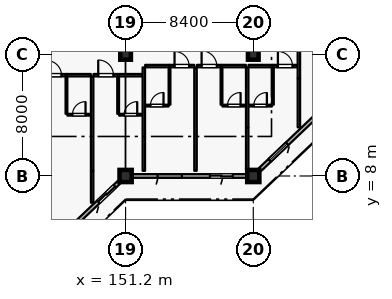
"""IFC4 building model, lengths in metres.
Left out: names, types, materials, properties, quantities, classifications, styles, units other than length and angle.
Written with IfcOpenShell. Run it as: python <this file> out.ifc"""

import sys

from ifc_helpers import new_model, si_unit, direction, frame, frame_2d, origin, origin_2d, place, context, subcontext, project, spatial, rectangle, extrude, element, fill, save


model = new_model("IFC4")
c1 = context("Model", 3, precision=1e-05, world=origin(), true_north=direction((0.0, 1.0)))
c2 = subcontext(c1, "Body", "Model", "MODEL_VIEW")
j1 = project(units=[si_unit("LENGTHUNIT", "METRE"), si_unit("PLANEANGLEUNIT", "RADIAN")], contexts=[c1])
p1 = place(None, origin())
s1 = spatial("IfcSite", under=j1, at=p1, CompositionType="ELEMENT")
p2 = place(p1, origin())
s2 = spatial("IfcBuilding", under=s1, at=p2, CompositionType="ELEMENT")
p3 = place(p2, frame((0.0, 0.0, 21.0)))
s3 = spatial("IfcBuildingStorey", under=s2, at=p3, CompositionType="ELEMENT", Elevation=21.0)
for number, where, z_axis, x_axis in (
    (1, (151.2, 8.0, 0.0), (0.0, 0.0, 1.0), (1.0, 0.0, 0.0)),
    (2, (159.6, 8.0, 0.0), (0.0, 0.0, 1.0), (1.0, 0.0, 0.0)),
):
    element("IfcColumn", number, at=place(p3, frame(where, z_axis=z_axis, x_axis=x_axis)), inside=s3, PredefinedType="COLUMN", context=c2, shape_type="SweptSolid", body=[
        extrude(rectangle(XDim=0.8, YDim=0.8, at=origin_2d()), origin(), (0.0, 0.0, 1.0), 4.2),
    ])
for number, where, z_axis, x_axis in (
    (3, (151.2, 16.0, 0.0), (0.0, 0.0, 1.0), (1.0, 0.0, 0.0)),
    (4, (159.6, 16.0, 0.0), (0.0, 0.0, 1.0), (1.0, 0.0, 0.0)),
):
    element("IfcColumn", number, at=place(p3, frame(where, z_axis=z_axis, x_axis=x_axis)), inside=s3, PredefinedType="COLUMN", context=c2, shape_type="SweptSolid", body=[
        extrude(rectangle(XDim=0.7, YDim=0.7, at=origin_2d()), origin(), (0.0, 0.0, 1.0), 4.2),
    ])
p4 = place(p3, frame((150.8, 7.619, 0.0), z_axis=(0.0, 0.0, 1.0), x_axis=(-0.724156739794, -0.689635422677, 0.0)))
e5 = element("IfcWall", 5, at=p4, inside=s3, PredefinedType="SOLIDWALL", context=c2, shape_type="SweptSolid", body=[
    extrude(rectangle(XDim=10.495, YDim=0.24, at=frame_2d((5.248, 0.0))), origin(), (0.0, 0.0, 1.0), 3.53),
])
p5 = place(p4, frame((0.424, 0.0, 0.0)))
e6 = element("IfcOpeningElement", 6, at=p5, cuts=e5, PredefinedType="OPENING", context=c2, shape_type="SweptSolid", body=[
    extrude(rectangle(XDim=1.5, YDim=2.25, at=frame_2d((0.75, 1.125))), frame((0.0, 0.13, 0.0), z_axis=(0.0, -1.0, 0.0), x_axis=(1.0, 0.0, 0.0)), (0.0, 0.0, 1.0), 0.26),
])
p6 = place(p4, frame((4.033, 0.0, 0.8)))
e7 = element("IfcOpeningElement", 7, at=p6, cuts=e5, PredefinedType="OPENING", context=c2, shape_type="SweptSolid", body=[
    extrude(rectangle(XDim=1.6, YDim=1.6, at=frame_2d((0.8, 0.8))), frame((0.0, 0.13, 0.0), z_axis=(0.0, -1.0, 0.0), x_axis=(1.0, 0.0, 0.0)), (0.0, 0.0, 1.0), 0.26),
])
p7 = place(p4, frame((8.107, 0.0, 0.8)))
e8 = element("IfcOpeningElement", 8, at=p7, cuts=e5, PredefinedType="OPENING", context=c2, shape_type="SweptSolid", body=[
    extrude(rectangle(XDim=1.6, YDim=1.6, at=frame_2d((0.8, 0.8))), frame((0.0, 0.13, 0.0), z_axis=(0.0, -1.0, 0.0), x_axis=(1.0, 0.0, 0.0)), (0.0, 0.0, 1.0), 0.26),
])
p8 = place(p3, frame((159.2, 8.0, 0.0), z_axis=(0.0, 0.0, 1.0), x_axis=(-1.0, 0.0, 0.0)))
e9 = element("IfcWall", 9, at=p8, inside=s3, PredefinedType="SOLIDWALL", context=c2, shape_type="SweptSolid", body=[
    extrude(rectangle(XDim=7.6, YDim=0.24, at=frame_2d((3.8, 0.0))), origin(), (0.0, 0.0, 1.0), 3.53),
])
p9 = place(p8, frame((0.95, 0.0, 0.0)))
e10 = element("IfcOpeningElement", 10, at=p9, cuts=e9, PredefinedType="OPENING", context=c2, shape_type="SweptSolid", body=[
    extrude(rectangle(XDim=1.5, YDim=2.25, at=frame_2d((0.75, 1.125))), frame((0.0, 0.13, 0.0), z_axis=(0.0, -1.0, 0.0), x_axis=(1.0, 0.0, 0.0)), (0.0, 0.0, 1.0), 0.26),
])
p10 = place(p8, frame((4.3, 0.0, 0.8)))
e11 = element("IfcOpeningElement", 11, at=p10, cuts=e9, PredefinedType="OPENING", context=c2, shape_type="SweptSolid", body=[
    extrude(rectangle(XDim=1.6, YDim=1.6, at=frame_2d((0.8, 0.8))), frame((0.0, 0.13, 0.0), z_axis=(0.0, -1.0, 0.0), x_axis=(1.0, 0.0, 0.0)), (0.0, 0.0, 1.0), 0.26),
])
p11 = place(p3, frame((167.6, 15.619, 0.0), z_axis=(0.0, 0.0, 1.0), x_axis=(-0.724156739794, -0.689635422677, 0.0)))
e12 = element("IfcWall", 12, at=p11, inside=s3, PredefinedType="SOLIDWALL", context=c2, shape_type="SweptSolid", body=[
    extrude(rectangle(XDim=10.495, YDim=0.24, at=frame_2d((5.248, 0.0))), origin(), (0.0, 0.0, 1.0), 3.53),
])
p12 = place(p11, frame((0.286, 0.0, 0.0)))
e13 = element("IfcOpeningElement", 13, at=p12, cuts=e12, PredefinedType="OPENING", context=c2, shape_type="SweptSolid", body=[
    extrude(rectangle(XDim=1.5, YDim=2.25, at=frame_2d((0.75, 1.125))), frame((0.0, 0.13, 0.0), z_axis=(0.0, -1.0, 0.0), x_axis=(1.0, 0.0, 0.0)), (0.0, 0.0, 1.0), 0.26),
])
p13 = place(p11, frame((3.757, 0.0, 0.8)))
e14 = element("IfcOpeningElement", 14, at=p13, cuts=e12, PredefinedType="OPENING", context=c2, shape_type="SweptSolid", body=[
    extrude(rectangle(XDim=1.6, YDim=1.6, at=frame_2d((0.8, 0.8))), frame((0.0, 0.13, 0.0), z_axis=(0.0, -1.0, 0.0), x_axis=(1.0, 0.0, 0.0)), (0.0, 0.0, 1.0), 0.26),
])
p14 = place(p11, frame((7.969, 0.0, 0.8)))
e15 = element("IfcOpeningElement", 15, at=p14, cuts=e12, PredefinedType="OPENING", context=c2, shape_type="SweptSolid", body=[
    extrude(rectangle(XDim=1.6, YDim=1.6, at=frame_2d((0.8, 0.8))), frame((0.0, 0.13, 0.0), z_axis=(0.0, -1.0, 0.0), x_axis=(1.0, 0.0, 0.0)), (0.0, 0.0, 1.0), 0.26),
])
p15 = place(p3, frame((145.69, 14.63, 0.0), z_axis=(0.0, 0.0, 1.0), x_axis=(1.0, 0.0, 0.0)))
e16 = element("IfcWall", 16, at=p15, inside=s3, PredefinedType="PARTITIONING", context=c2, shape_type="SweptSolid", body=[
    extrude(rectangle(XDim=1.62, YDim=0.16, at=frame_2d((0.81, 0.0))), origin(), (0.0, 0.0, 1.0), 3.965),
])
p16 = place(p15, frame((0.33, 0.0, 0.0)))
e17 = element("IfcOpeningElement", 17, at=p16, cuts=e16, PredefinedType="OPENING", context=c2, shape_type="SweptSolid", body=[
    extrude(rectangle(XDim=0.96, YDim=2.2, at=frame_2d((0.48, 1.1))), frame((0.0, 0.09, 0.0), z_axis=(0.0, -1.0, 0.0), x_axis=(1.0, 0.0, 0.0)), (0.0, 0.0, 1.0), 0.18),
])
p17 = place(p3, frame((147.32, 14.63, 0.0), z_axis=(0.0, 0.0, 1.0), x_axis=(1.0, 0.0, 0.0)))
e18 = element("IfcWall", 18, at=p17, inside=s3, PredefinedType="PARTITIONING", context=c2, shape_type="SweptSolid", body=[
    extrude(rectangle(XDim=1.59, YDim=0.16, at=frame_2d((0.795, 0.0))), origin(), (0.0, 0.0, 1.0), 3.965),
])
p18 = place(p3, frame((147.31, 12.09, 0.0), z_axis=(0.0, 0.0, 1.0), x_axis=(0.0, 1.0, 0.0)))
e19 = element("IfcWall", 19, at=p18, inside=s3, PredefinedType="PARTITIONING", context=c2, shape_type="SweptSolid", body=[
    extrude(rectangle(XDim=2.45, YDim=0.115, at=frame_2d((1.225, 0.0))), origin(), (0.0, 0.0, 1.0), 3.965),
])
p19 = place(p3, frame((147.37, 12.03, 0.0), z_axis=(0.0, 0.0, 1.0), x_axis=(1.0, 0.0, 0.0)))
e20 = element("IfcWall", 20, at=p19, inside=s3, PredefinedType="PARTITIONING", context=c2, shape_type="SweptSolid", body=[
    extrude(rectangle(XDim=1.53, YDim=0.115, at=frame_2d((0.765, 0.0))), origin(), (0.0, 0.0, 1.0), 3.965),
])
p20 = place(p19, frame((0.335, 0.0, 0.0)))
e21 = element("IfcOpeningElement", 21, at=p20, cuts=e20, PredefinedType="OPENING", context=c2, shape_type="SweptSolid", body=[
    extrude(rectangle(XDim=0.86, YDim=2.12, at=frame_2d((0.43, 1.06))), frame((0.0, 0.067, 0.0), z_axis=(0.0, -1.0, 0.0), x_axis=(1.0, 0.0, 0.0)), (0.0, 0.0, 1.0), 0.135),
])
p21 = place(p3, frame((149.0, 6.24, 0.0), z_axis=(0.0, 0.0, 1.0), x_axis=(0.0, 1.0, 0.0)))
e22 = element("IfcWall", 22, at=p21, inside=s3, PredefinedType="PARTITIONING", context=c2, shape_type="SweptSolid", body=[
    extrude(rectangle(XDim=2.09, YDim=0.16, at=frame_2d((1.045, 0.0))), origin(), (0.0, 0.0, 1.0), 3.965),
])
p22 = place(p3, frame((149.09, 14.63, 0.0), z_axis=(0.0, 0.0, 1.0), x_axis=(1.0, 0.0, 0.0)))
e23 = element("IfcWall", 23, at=p22, inside=s3, PredefinedType="PARTITIONING", context=c2, shape_type="SweptSolid", body=[
    extrude(rectangle(XDim=1.62, YDim=0.16, at=frame_2d((0.81, 0.0))), origin(), (0.0, 0.0, 1.0), 3.965),
])
p23 = place(p22, frame((0.31, 0.0, 0.0)))
e24 = element("IfcOpeningElement", 24, at=p23, cuts=e23, PredefinedType="OPENING", context=c2, shape_type="SweptSolid", body=[
    extrude(rectangle(XDim=1.0, YDim=2.25, at=frame_2d((0.5, 1.125))), frame((0.0, 0.09, 0.0), z_axis=(0.0, -1.0, 0.0), x_axis=(1.0, 0.0, 0.0)), (0.0, 0.0, 1.0), 0.18),
])
p24 = place(p3, frame((150.72, 14.63, 0.0), z_axis=(0.0, 0.0, 1.0), x_axis=(1.0, 0.0, 0.0)))
e25 = element("IfcWall", 25, at=p24, inside=s3, PredefinedType="PARTITIONING", context=c2, shape_type="SweptSolid", body=[
    extrude(rectangle(XDim=1.59, YDim=0.16, at=frame_2d((0.795, 0.0))), origin(), (0.0, 0.0, 1.0), 3.965),
])
p25 = place(p3, frame((150.71, 12.09, 0.0), z_axis=(0.0, 0.0, 1.0), x_axis=(0.0, 1.0, 0.0)))
e26 = element("IfcWall", 26, at=p25, inside=s3, PredefinedType="PARTITIONING", context=c2, shape_type="SweptSolid", body=[
    extrude(rectangle(XDim=2.45, YDim=0.115, at=frame_2d((1.225, 0.0))), origin(), (0.0, 0.0, 1.0), 3.965),
])
p26 = place(p3, frame((150.77, 12.03, 0.0), z_axis=(0.0, 0.0, 1.0), x_axis=(1.0, 0.0, 0.0)))
e27 = element("IfcWall", 27, at=p26, inside=s3, PredefinedType="PARTITIONING", context=c2, shape_type="SweptSolid", body=[
    extrude(rectangle(XDim=1.53, YDim=0.115, at=frame_2d((0.765, 0.0))), origin(), (0.0, 0.0, 1.0), 3.965),
])
p27 = place(p26, frame((0.335, 0.0, 0.0)))
e28 = element("IfcOpeningElement", 28, at=p27, cuts=e27, PredefinedType="OPENING", context=c2, shape_type="SweptSolid", body=[
    extrude(rectangle(XDim=0.86, YDim=2.12, at=frame_2d((0.43, 1.06))), frame((0.0, 0.067, 0.0), z_axis=(0.0, -1.0, 0.0), x_axis=(1.0, 0.0, 0.0)), (0.0, 0.0, 1.0), 0.135),
])
p28 = place(p3, frame((149.0, 8.34, 0.0), z_axis=(0.0, 0.0, 1.0), x_axis=(0.0, 1.0, 0.0)))
e29 = element("IfcWall", 29, at=p28, inside=s3, PredefinedType="PARTITIONING", context=c2, shape_type="SweptSolid", body=[
    extrude(rectangle(XDim=6.2, YDim=0.16, at=frame_2d((3.1, 0.0))), origin(), (0.0, 0.0, 1.0), 3.965),
])
p29 = place(p3, frame((152.49, 15.23, 0.0), z_axis=(0.0, 0.0, 1.0), x_axis=(1.0, 0.0, 0.0)))
e30 = element("IfcWall", 30, at=p29, inside=s3, PredefinedType="PARTITIONING", context=c2, shape_type="SweptSolid", body=[
    extrude(rectangle(XDim=1.59, YDim=0.16, at=frame_2d((0.795, 0.0))), origin(), (0.0, 0.0, 1.0), 3.965),
])
p30 = place(p3, frame((154.09, 15.23, 0.0), z_axis=(0.0, 0.0, 1.0), x_axis=(1.0, 0.0, 0.0)))
e31 = element("IfcWall", 31, at=p30, inside=s3, PredefinedType="PARTITIONING", context=c2, shape_type="SweptSolid", body=[
    extrude(rectangle(XDim=1.62, YDim=0.16, at=frame_2d((0.81, 0.0))), origin(), (0.0, 0.0, 1.0), 3.965),
])
p31 = place(p30, frame((0.33, 0.0, 0.0)))
e32 = element("IfcOpeningElement", 32, at=p31, cuts=e31, PredefinedType="OPENING", context=c2, shape_type="SweptSolid", body=[
    extrude(rectangle(XDim=0.96, YDim=2.2, at=frame_2d((0.48, 1.1))), frame((0.0, 0.09, 0.0), z_axis=(0.0, -1.0, 0.0), x_axis=(1.0, 0.0, 0.0)), (0.0, 0.0, 1.0), 0.18),
])
p32 = place(p3, frame((154.09, 12.69, 0.0), z_axis=(0.0, 0.0, 1.0), x_axis=(0.0, 1.0, 0.0)))
e33 = element("IfcWall", 33, at=p32, inside=s3, PredefinedType="PARTITIONING", context=c2, shape_type="SweptSolid", body=[
    extrude(rectangle(XDim=2.45, YDim=0.115, at=frame_2d((1.225, 0.0))), origin(), (0.0, 0.0, 1.0), 3.965),
])
p33 = place(p3, frame((152.5, 12.63, 0.0), z_axis=(0.0, 0.0, 1.0), x_axis=(1.0, 0.0, 0.0)))
e34 = element("IfcWall", 34, at=p33, inside=s3, PredefinedType="PARTITIONING", context=c2, shape_type="SweptSolid", body=[
    extrude(rectangle(XDim=1.53, YDim=0.115, at=frame_2d((0.765, 0.0))), origin(), (0.0, 0.0, 1.0), 3.965),
])
p34 = place(p33, frame((0.335, 0.0, 0.0)))
e35 = element("IfcOpeningElement", 35, at=p34, cuts=e34, PredefinedType="OPENING", context=c2, shape_type="SweptSolid", body=[
    extrude(rectangle(XDim=0.86, YDim=2.12, at=frame_2d((0.43, 1.06))), frame((0.0, 0.067, 0.0), z_axis=(0.0, -1.0, 0.0), x_axis=(1.0, 0.0, 0.0)), (0.0, 0.0, 1.0), 0.135),
])
p35 = place(p3, frame((152.4, 8.34, 0.0), z_axis=(0.0, 0.0, 1.0), x_axis=(0.0, 1.0, 0.0)))
e36 = element("IfcWall", 36, at=p35, inside=s3, PredefinedType="PARTITIONING", context=c2, shape_type="SweptSolid", body=[
    extrude(rectangle(XDim=6.8, YDim=0.16, at=frame_2d((3.4, 0.0))), origin(), (0.0, 0.0, 1.0), 3.965),
])
p36 = place(p3, frame((155.89, 15.23, 0.0), z_axis=(0.0, 0.0, 1.0), x_axis=(1.0, 0.0, 0.0)))
e37 = element("IfcWall", 37, at=p36, inside=s3, PredefinedType="PARTITIONING", context=c2, shape_type="SweptSolid", body=[
    extrude(rectangle(XDim=1.62, YDim=0.16, at=frame_2d((0.81, 0.0))), origin(), (0.0, 0.0, 1.0), 3.965),
])
p37 = place(p36, frame((0.31, 0.0, 0.0)))
e38 = element("IfcOpeningElement", 38, at=p37, cuts=e37, PredefinedType="OPENING", context=c2, shape_type="SweptSolid", body=[
    extrude(rectangle(XDim=1.0, YDim=2.25, at=frame_2d((0.5, 1.125))), frame((0.0, 0.09, 0.0), z_axis=(0.0, -1.0, 0.0), x_axis=(1.0, 0.0, 0.0)), (0.0, 0.0, 1.0), 0.18),
])
p38 = place(p3, frame((157.52, 15.23, 0.0), z_axis=(0.0, 0.0, 1.0), x_axis=(1.0, 0.0, 0.0)))
e39 = element("IfcWall", 39, at=p38, inside=s3, PredefinedType="PARTITIONING", context=c2, shape_type="SweptSolid", body=[
    extrude(rectangle(XDim=1.59, YDim=0.16, at=frame_2d((0.795, 0.0))), origin(), (0.0, 0.0, 1.0), 3.965),
])
p39 = place(p3, frame((157.51, 12.69, 0.0), z_axis=(0.0, 0.0, 1.0), x_axis=(0.0, 1.0, 0.0)))
e40 = element("IfcWall", 40, at=p39, inside=s3, PredefinedType="PARTITIONING", context=c2, shape_type="SweptSolid", body=[
    extrude(rectangle(XDim=2.45, YDim=0.115, at=frame_2d((1.225, 0.0))), origin(), (0.0, 0.0, 1.0), 3.965),
])
p40 = place(p3, frame((157.57, 12.63, 0.0), z_axis=(0.0, 0.0, 1.0), x_axis=(1.0, 0.0, 0.0)))
e41 = element("IfcWall", 41, at=p40, inside=s3, PredefinedType="PARTITIONING", context=c2, shape_type="SweptSolid", body=[
    extrude(rectangle(XDim=1.53, YDim=0.115, at=frame_2d((0.765, 0.0))), origin(), (0.0, 0.0, 1.0), 3.965),
])
p41 = place(p40, frame((0.335, 0.0, 0.0)))
e42 = element("IfcOpeningElement", 42, at=p41, cuts=e41, PredefinedType="OPENING", context=c2, shape_type="SweptSolid", body=[
    extrude(rectangle(XDim=0.86, YDim=2.12, at=frame_2d((0.43, 1.06))), frame((0.0, 0.067, 0.0), z_axis=(0.0, -1.0, 0.0), x_axis=(1.0, 0.0, 0.0)), (0.0, 0.0, 1.0), 0.135),
])
p42 = place(p3, frame((155.8, 8.34, 0.0), z_axis=(0.0, 0.0, 1.0), x_axis=(0.0, 1.0, 0.0)))
e43 = element("IfcWall", 43, at=p42, inside=s3, PredefinedType="PARTITIONING", context=c2, shape_type="SweptSolid", body=[
    extrude(rectangle(XDim=6.8, YDim=0.16, at=frame_2d((3.4, 0.0))), origin(), (0.0, 0.0, 1.0), 3.965),
])
p43 = place(p3, frame((159.2, 8.41, 0.0), z_axis=(0.0, 0.0, 1.0), x_axis=(0.0, 1.0, 0.0)))
e44 = element("IfcWall", 44, at=p43, inside=s3, PredefinedType="PARTITIONING", context=c2, shape_type="SweptSolid", body=[
    extrude(rectangle(XDim=2.78, YDim=0.16, at=frame_2d((1.39, 0.0))), origin(), (0.0, 0.0, 1.0), 3.965),
])
p44 = place(p3, frame((159.29, 15.23, 0.0), z_axis=(0.0, 0.0, 1.0), x_axis=(1.0, 0.0, 0.0)))
e45 = element("IfcWall", 45, at=p44, inside=s3, PredefinedType="PARTITIONING", context=c2, shape_type="SweptSolid", body=[
    extrude(rectangle(XDim=1.59, YDim=0.16, at=frame_2d((0.795, 0.0))), origin(), (0.0, 0.0, 1.0), 3.965),
])
p45 = place(p3, frame((160.89, 15.23, 0.0), z_axis=(0.0, 0.0, 1.0), x_axis=(1.0, 0.0, 0.0)))
e46 = element("IfcWall", 46, at=p45, inside=s3, PredefinedType="PARTITIONING", context=c2, shape_type="SweptSolid", body=[
    extrude(rectangle(XDim=1.62, YDim=0.16, at=frame_2d((0.81, 0.0))), origin(), (0.0, 0.0, 1.0), 3.965),
])
p46 = place(p45, frame((0.33, 0.0, 0.0)))
e47 = element("IfcOpeningElement", 47, at=p46, cuts=e46, PredefinedType="OPENING", context=c2, shape_type="SweptSolid", body=[
    extrude(rectangle(XDim=0.96, YDim=2.2, at=frame_2d((0.48, 1.1))), frame((0.0, 0.09, 0.0), z_axis=(0.0, -1.0, 0.0), x_axis=(1.0, 0.0, 0.0)), (0.0, 0.0, 1.0), 0.18),
])
p47 = place(p3, frame((160.89, 12.69, 0.0), z_axis=(0.0, 0.0, 1.0), x_axis=(0.0, 1.0, 0.0)))
e48 = element("IfcWall", 48, at=p47, inside=s3, PredefinedType="PARTITIONING", context=c2, shape_type="SweptSolid", body=[
    extrude(rectangle(XDim=2.45, YDim=0.115, at=frame_2d((1.225, 0.0))), origin(), (0.0, 0.0, 1.0), 3.965),
])
p48 = place(p3, frame((159.3, 12.63, 0.0), z_axis=(0.0, 0.0, 1.0), x_axis=(1.0, 0.0, 0.0)))
e49 = element("IfcWall", 49, at=p48, inside=s3, PredefinedType="PARTITIONING", context=c2, shape_type="SweptSolid", body=[
    extrude(rectangle(XDim=1.53, YDim=0.115, at=frame_2d((0.765, 0.0))), origin(), (0.0, 0.0, 1.0), 3.965),
])
p49 = place(p48, frame((0.335, 0.0, 0.0)))
e50 = element("IfcOpeningElement", 50, at=p49, cuts=e49, PredefinedType="OPENING", context=c2, shape_type="SweptSolid", body=[
    extrude(rectangle(XDim=0.86, YDim=2.12, at=frame_2d((0.43, 1.06))), frame((0.0, 0.067, 0.0), z_axis=(0.0, -1.0, 0.0), x_axis=(1.0, 0.0, 0.0)), (0.0, 0.0, 1.0), 0.135),
])
p50 = place(p3, frame((159.2, 11.2, 0.0), z_axis=(0.0, 0.0, 1.0), x_axis=(0.0, 1.0, 0.0)))
e51 = element("IfcWall", 51, at=p50, inside=s3, PredefinedType="PARTITIONING", context=c2, shape_type="SweptSolid", body=[
    extrude(rectangle(XDim=3.94, YDim=0.16, at=frame_2d((1.97, 0.0))), origin(), (0.0, 0.0, 1.0), 3.965),
])
p51 = place(p3, frame((162.6, 11.2, 0.0), z_axis=(0.0, 0.0, 1.0), x_axis=(0.0, 1.0, 0.0)))
e52 = element("IfcWall", 52, at=p51, inside=s3, PredefinedType="PARTITIONING", context=c2, shape_type="SweptSolid", body=[
    extrude(rectangle(XDim=3.23, YDim=0.16, at=frame_2d((1.615, 0.0))), origin(), (0.0, 0.0, 1.0), 3.965),
])
p52 = place(p3, frame((162.6, 14.44, 0.0), z_axis=(0.0, 0.0, 1.0), x_axis=(0.0, 1.0, 0.0)))
e53 = element("IfcWall", 53, at=p52, inside=s3, PredefinedType="PARTITIONING", context=c2, shape_type="SweptSolid", body=[
    extrude(rectangle(XDim=8.7, YDim=0.16, at=frame_2d((4.35, 0.0))), origin(), (0.0, 0.0, 1.0), 3.965),
])
p53 = place(p5, origin())
e54 = element("IfcDoor", 54, at=p53, inside=s3, OperationType="SLIDING_TO_LEFT", PredefinedType="DOOR", context=c2, shape_type="SweptSolid", body=[
    extrude(rectangle(XDim=1.5, YDim=2.25, at=frame_2d((0.75, 1.125))), frame((0.0, 0.025, 0.0), z_axis=(0.0, -1.0, 0.0), x_axis=(1.0, 0.0, 0.0)), (0.0, 0.0, 1.0), 0.05),
])
fill(e6, e54)
p54 = place(p9, origin())
e55 = element("IfcDoor", 55, at=p54, inside=s3, OperationType="SLIDING_TO_LEFT", PredefinedType="DOOR", context=c2, shape_type="SweptSolid", body=[
    extrude(rectangle(XDim=1.5, YDim=2.25, at=frame_2d((0.75, 1.125))), frame((0.0, 0.025, 0.0), z_axis=(0.0, -1.0, 0.0), x_axis=(1.0, 0.0, 0.0)), (0.0, 0.0, 1.0), 0.05),
])
fill(e10, e55)
p55 = place(p10, origin())
e56 = element("IfcWindow", 56, at=p55, inside=s3, PartitioningType="SINGLE_PANEL", PredefinedType="WINDOW", context=c2, shape_type="SweptSolid", body=[
    extrude(rectangle(XDim=1.6, YDim=1.6, at=frame_2d((0.8, 0.8))), frame((0.0, 0.03, 0.0), z_axis=(0.0, -1.0, 0.0), x_axis=(1.0, 0.0, 0.0)), (0.0, 0.0, 1.0), 0.06),
])
fill(e11, e56)
p56 = place(p14, origin())
e57 = element("IfcWindow", 57, at=p56, inside=s3, PartitioningType="SINGLE_PANEL", PredefinedType="WINDOW", context=c2, shape_type="SweptSolid", body=[
    extrude(rectangle(XDim=1.6, YDim=1.6, at=frame_2d((0.8, 0.8))), frame((0.0, 0.03, 0.0), z_axis=(0.0, -1.0, 0.0), x_axis=(1.0, 0.0, 0.0)), (0.0, 0.0, 1.0), 0.06),
])
fill(e15, e57)
p57 = place(p16, origin())
e58 = element("IfcDoor", 58, at=p57, inside=s3, OperationType="SINGLE_SWING_LEFT", PredefinedType="DOOR", context=c2, shape_type="SweptSolid", body=[
    extrude(rectangle(XDim=0.96, YDim=2.2, at=frame_2d((0.48, 1.1))), frame((0.0, 0.025, 0.0), z_axis=(0.0, -1.0, 0.0), x_axis=(1.0, 0.0, 0.0)), (0.0, 0.0, 1.0), 0.05),
])
fill(e17, e58)
p58 = place(p20, origin())
e59 = element("IfcDoor", 59, at=p58, inside=s3, OperationType="SINGLE_SWING_RIGHT", PredefinedType="DOOR", context=c2, shape_type="SweptSolid", body=[
    extrude(rectangle(XDim=0.86, YDim=2.12, at=frame_2d((0.43, 1.06))), frame((0.0, 0.025, 0.0), z_axis=(0.0, -1.0, 0.0), x_axis=(1.0, 0.0, 0.0)), (0.0, 0.0, 1.0), 0.05),
])
fill(e21, e59)
p59 = place(p23, origin())
e60 = element("IfcDoor", 60, at=p59, inside=s3, OperationType="SINGLE_SWING_LEFT", PredefinedType="DOOR", context=c2, shape_type="SweptSolid", body=[
    extrude(rectangle(XDim=1.0, YDim=2.25, at=frame_2d((0.5, 1.125))), frame((0.0, 0.025, 0.0), z_axis=(0.0, -1.0, 0.0), x_axis=(1.0, 0.0, 0.0)), (0.0, 0.0, 1.0), 0.05),
])
fill(e24, e60)
p60 = place(p27, origin())
e61 = element("IfcDoor", 61, at=p60, inside=s3, OperationType="SINGLE_SWING_RIGHT", PredefinedType="DOOR", context=c2, shape_type="SweptSolid", body=[
    extrude(rectangle(XDim=0.86, YDim=2.12, at=frame_2d((0.43, 1.06))), frame((0.0, 0.025, 0.0), z_axis=(0.0, -1.0, 0.0), x_axis=(1.0, 0.0, 0.0)), (0.0, 0.0, 1.0), 0.05),
])
fill(e28, e61)
p61 = place(p31, origin())
e62 = element("IfcDoor", 62, at=p61, inside=s3, OperationType="SINGLE_SWING_LEFT", PredefinedType="DOOR", context=c2, shape_type="SweptSolid", body=[
    extrude(rectangle(XDim=0.96, YDim=2.2, at=frame_2d((0.48, 1.1))), frame((0.0, 0.025, 0.0), z_axis=(0.0, -1.0, 0.0), x_axis=(1.0, 0.0, 0.0)), (0.0, 0.0, 1.0), 0.05),
])
fill(e32, e62)
p62 = place(p34, origin())
e63 = element("IfcDoor", 63, at=p62, inside=s3, OperationType="SINGLE_SWING_RIGHT", PredefinedType="DOOR", context=c2, shape_type="SweptSolid", body=[
    extrude(rectangle(XDim=0.86, YDim=2.12, at=frame_2d((0.43, 1.06))), frame((0.0, 0.025, 0.0), z_axis=(0.0, -1.0, 0.0), x_axis=(1.0, 0.0, 0.0)), (0.0, 0.0, 1.0), 0.05),
])
fill(e35, e63)
p63 = place(p37, origin())
e64 = element("IfcDoor", 64, at=p63, inside=s3, OperationType="SINGLE_SWING_LEFT", PredefinedType="DOOR", context=c2, shape_type="SweptSolid", body=[
    extrude(rectangle(XDim=1.0, YDim=2.25, at=frame_2d((0.5, 1.125))), frame((0.0, 0.025, 0.0), z_axis=(0.0, -1.0, 0.0), x_axis=(1.0, 0.0, 0.0)), (0.0, 0.0, 1.0), 0.05),
])
fill(e38, e64)
p64 = place(p41, origin())
e65 = element("IfcDoor", 65, at=p64, inside=s3, OperationType="SINGLE_SWING_RIGHT", PredefinedType="DOOR", context=c2, shape_type="SweptSolid", body=[
    extrude(rectangle(XDim=0.86, YDim=2.12, at=frame_2d((0.43, 1.06))), frame((0.0, 0.025, 0.0), z_axis=(0.0, -1.0, 0.0), x_axis=(1.0, 0.0, 0.0)), (0.0, 0.0, 1.0), 0.05),
])
fill(e42, e65)
p65 = place(p46, origin())
e66 = element("IfcDoor", 66, at=p65, inside=s3, OperationType="SINGLE_SWING_LEFT", PredefinedType="DOOR", context=c2, shape_type="SweptSolid", body=[
    extrude(rectangle(XDim=0.96, YDim=2.2, at=frame_2d((0.48, 1.1))), frame((0.0, 0.025, 0.0), z_axis=(0.0, -1.0, 0.0), x_axis=(1.0, 0.0, 0.0)), (0.0, 0.0, 1.0), 0.05),
])
fill(e47, e66)
p66 = place(p49, origin())
e67 = element("IfcDoor", 67, at=p66, inside=s3, OperationType="SINGLE_SWING_RIGHT", PredefinedType="DOOR", context=c2, shape_type="SweptSolid", body=[
    extrude(rectangle(XDim=0.86, YDim=2.12, at=frame_2d((0.43, 1.06))), frame((0.0, 0.025, 0.0), z_axis=(0.0, -1.0, 0.0), x_axis=(1.0, 0.0, 0.0)), (0.0, 0.0, 1.0), 0.05),
])
fill(e50, e67)
save(model, sys.argv[1])
